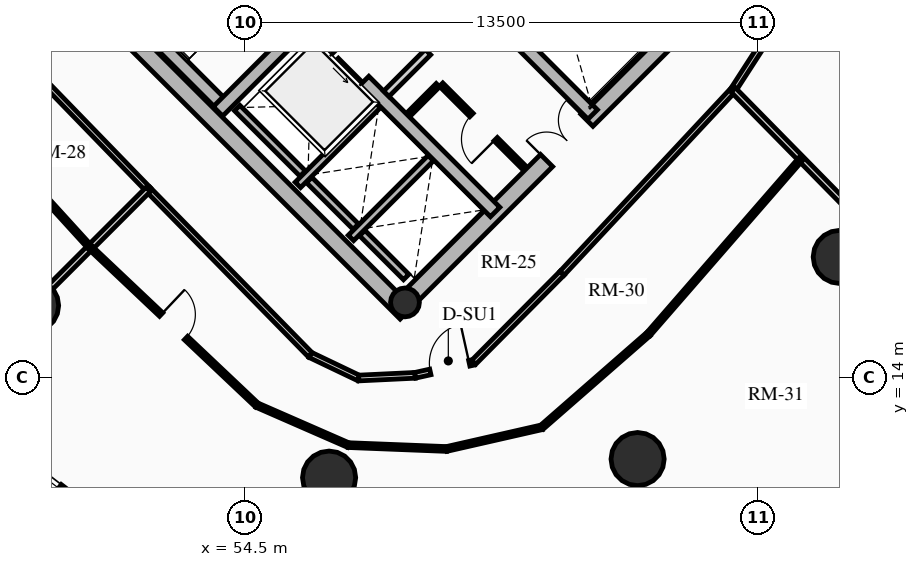
"""IFC4 building model, lengths in metres.
Left out: names, types, materials, properties, quantities, classifications, styles, units other than length and angle.
Written with IfcOpenShell. Run it as: python <this file> out.ifc"""

import sys

from ifc_helpers import new_model, si_unit, direction, frame, frame_2d, origin, origin_2d, place, context, subcontext, project, spatial, rectangle, circle, hollow_circle, extrude, source, transform, mapped, element, fill, save


model = new_model("IFC4")
c1 = context("Model", 3, precision=1e-05, world=origin(), true_north=direction((0.0, 1.0)))
c2 = subcontext(c1, "Body", "Model", "MODEL_VIEW")
j1 = project(units=[si_unit("LENGTHUNIT", "METRE"), si_unit("PLANEANGLEUNIT", "RADIAN")], contexts=[c1])
p1 = place(None, origin())
s1 = spatial("IfcSite", under=j1, at=p1, CompositionType="ELEMENT")
p2 = place(p1, origin())
s2 = spatial("IfcBuilding", under=s1, at=p2, CompositionType="ELEMENT")
p3 = place(p2, frame((0.0, 0.0, 87.61)))
s3 = spatial("IfcBuildingStorey", under=s2, at=p3, CompositionType="ELEMENT", Elevation=87.61)
p4 = place(p3, frame((58.737, 15.697, 0.0), z_axis=(0.0, 0.0, 1.0), x_axis=(-0.707106781187, 0.707106781187, 0.0)))
e1 = element("IfcWall", 1, at=p4, inside=s3, PredefinedType="SHEAR", context=c2, shape_type="SweptSolid", body=[
    extrude(rectangle(XDim=14.2, YDim=0.45, at=frame_2d((7.1, 0.0))), origin(), (0.0, 0.0, 1.0), 2.91),
])
p5 = place(p3, frame((58.578, 15.856, 0.0), z_axis=(0.0, 0.0, 1.0), x_axis=(0.707106781187, 0.707106781187, 0.0)))
e2 = element("IfcWall", 2, at=p5, inside=s3, PredefinedType="SHEAR", context=c2, shape_type="SweptSolid", body=[
    extrude(rectangle(XDim=10.7, YDim=0.45, at=frame_2d((5.35, 0.0))), origin(), (0.0, 0.0, 1.0), 2.91),
])
m1 = source(origin(), c2, "Body", "SweptSolid", [
    extrude(rectangle(XDim=1.5, YDim=2.02, at=frame_2d((0.75, 1.01))), frame((0.0, 0.235, 0.0), z_axis=(0.0, -1.0, 0.0), x_axis=(1.0, 0.0, 0.0)), (0.0, 0.0, 1.0), 0.47),
])
p6 = place(p5, frame((5.45, 0.0, 0.0)))
e3 = element("IfcOpeningElement", 3, at=p6, cuts=e2, PredefinedType="OPENING", context=c2, shape_type="MappedRepresentation", body=[
    mapped(m1, transform((0.0, 0.0, 0.0), x_axis=(1.0, 0.0, 0.0), y_axis=(0.0, 1.0, 0.0), z_axis=(0.0, 0.0, 1.0), scale=1.0)),
])
p7 = place(p3, frame((61.078, 18.355, 0.0), z_axis=(0.0, 0.0, 1.0), x_axis=(-0.707106781187, 0.707106781187, 0.0)))
e4 = element("IfcWall", 4, at=p7, inside=s3, PredefinedType="SHEAR", context=c2, shape_type="SweptSolid", body=[
    extrude(rectangle(XDim=13.75, YDim=0.35, at=frame_2d((6.875, 0.0))), origin(), (0.0, 0.0, 1.0), 2.91),
])
m2 = source(origin(), c2, "Body", "SweptSolid", [
    extrude(rectangle(XDim=1.1, YDim=2.015, at=frame_2d((0.55, 1.007))), frame((0.0, 0.185, 0.0), z_axis=(0.0, -1.0, 0.0), x_axis=(1.0, 0.0, 0.0)), (0.0, 0.0, 1.0), 0.37),
])
p8 = place(p7, frame((4.875, 0.0, 0.0)))
e5 = element("IfcOpeningElement", 5, at=p8, cuts=e4, PredefinedType="OPENING", context=c2, shape_type="MappedRepresentation", body=[
    mapped(m2, transform((0.0, 0.0, 0.0), x_axis=(1.0, 0.0, 0.0), y_axis=(0.0, 1.0, 0.0), z_axis=(0.0, 0.0, 1.0), scale=1.0)),
])
m3 = source(origin(), c2, "Body", "SweptSolid", [
    extrude(rectangle(XDim=1.15, YDim=2.02, at=frame_2d((0.575, 1.01))), frame((0.0, 0.185, 0.0), z_axis=(0.0, -1.0, 0.0), x_axis=(1.0, 0.0, 0.0)), (0.0, 0.0, 1.0), 0.37),
])
p9 = place(p7, frame((7.295, 0.0, 0.0)))
e6 = element("IfcOpeningElement", 6, at=p9, cuts=e4, PredefinedType="OPENING", context=c2, shape_type="MappedRepresentation", body=[
    mapped(m3, transform((0.0, 0.0, 0.0), x_axis=(1.0, 0.0, 0.0), y_axis=(0.0, 1.0, 0.0), z_axis=(0.0, 0.0, 1.0), scale=1.0)),
])
p10 = place(p3, frame((63.645, 20.922, 0.0), z_axis=(0.0, 0.0, 1.0), x_axis=(-0.707106781187, 0.707106781187, 0.0)))
e7 = element("IfcWall", 7, at=p10, inside=s3, PredefinedType="SHEAR", context=c2, shape_type="SweptSolid", body=[
    extrude(rectangle(XDim=13.75, YDim=0.35, at=frame_2d((6.875, 0.0))), origin(), (0.0, 0.0, 1.0), 2.91),
])
p11 = place(p10, frame((10.0, 0.0, 0.0)))
e8 = element("IfcOpeningElement", 8, at=p11, cuts=e7, PredefinedType="OPENING", context=c2, shape_type="MappedRepresentation", body=[
    mapped(m2, transform((0.0, 0.0, 0.0), x_axis=(1.0, 0.0, 0.0), y_axis=(0.0, 1.0, 0.0), z_axis=(0.0, 0.0, 1.0), scale=1.0)),
])
p12 = place(p10, frame((12.0, 0.0, 0.0)))
e9 = element("IfcOpeningElement", 9, at=p12, cuts=e7, PredefinedType="OPENING", context=c2, shape_type="MappedRepresentation", body=[
    mapped(m2, transform((0.0, 0.0, 0.0), x_axis=(1.0, 0.0, 0.0), y_axis=(0.0, 1.0, 0.0), z_axis=(0.0, 0.0, 1.0), scale=1.0)),
])
p13 = place(p10, frame((5.305, 0.0, 0.0)))
e10 = element("IfcOpeningElement", 10, at=p13, cuts=e7, PredefinedType="OPENING", context=c2, shape_type="MappedRepresentation", body=[
    mapped(m3, transform((0.0, 0.0, 0.0), x_axis=(1.0, 0.0, 0.0), y_axis=(0.0, 1.0, 0.0), z_axis=(0.0, 0.0, 1.0), scale=1.0)),
])
p14 = place(p3, frame((53.922, 21.141, 0.0), z_axis=(0.0, 0.0, 1.0), x_axis=(-0.707088616009, 0.707124945897, 0.0)))
e11 = element("IfcWall", 11, at=p14, inside=s3, PredefinedType="SHEAR", context=c2, shape_type="SweptSolid", body=[
    extrude(rectangle(XDim=6.72, YDim=0.35, at=frame_2d((3.36, 0.0))), origin(), (0.0, 0.0, 1.0), 2.91),
])
p15 = place(p3, frame((53.784, 21.003, 0.0), z_axis=(0.0, 0.0, 1.0), x_axis=(0.707106781187, 0.707106781187, 0.0)))
e12 = element("IfcWall", 12, at=p15, inside=s3, PredefinedType="SHEAR", context=c2, shape_type="SweptSolid", body=[
    extrude(rectangle(XDim=3.285, YDim=0.35, at=frame_2d((1.643, 0.0))), origin(), (0.0, 0.0, 1.0), 2.91),
])
p16 = place(p3, frame((58.706, 15.976, 0.0), z_axis=(0.0, 0.0, 1.0), x_axis=(0.707106781187, 0.707106781187, 0.0)))
e13 = element("IfcColumn", 13, at=p16, inside=s3, PredefinedType="COLUMN", context=c2, shape_type="SweptSolid", body=[
    extrude(hollow_circle(Radius=0.38, WallThickness=0.032, at=origin_2d()), origin(), (0.0, 0.0, 1.0), 2.91),
])
for number, where, z_axis, x_axis in (
    (14, (48.893, 15.893, 0.0), (0.0, 0.0, 1.0), (1.0, 0.0, 0.0)),
    (15, (56.709, 11.365, 0.0), (0.0, 0.0, 1.0), (1.0, 0.0, 0.0)),
    (16, (64.827, 11.854, 0.0), (0.0, 0.0, 1.0), (1.0, 0.0, 0.0)),
    (17, (70.146, 17.173, 0.0), (0.0, 0.0, 1.0), (1.0, 0.0, 0.0)),
):
    element("IfcColumn", number, at=place(p3, frame(where, z_axis=z_axis, x_axis=x_axis)), inside=s3, PredefinedType="USERDEFINED", context=c2, shape_type="SweptSolid", body=[
        extrude(circle(Radius=0.7, at=origin_2d()), origin(), (0.0, 0.0, 1.0), 2.91),
    ])
p17 = place(p3, frame((51.189, 9.855, 0.0), z_axis=(0.0, 0.0, 1.0), x_axis=(-0.791982052206, 0.61054437102, 0.0)))
e18 = element("IfcWall", 18, at=p17, inside=s3, PredefinedType="SOLIDWALL", context=c2, shape_type="SweptSolid", body=[
    extrude(rectangle(XDim=5.942, YDim=0.24, at=frame_2d((2.971, 0.0))), origin(), (0.0, 0.0, 1.0), 2.179),
])
m4 = source(origin(), c2, "Body", "SweptSolid", [
    extrude(rectangle(XDim=1.9, YDim=1.35, at=frame_2d((0.95, 0.675))), frame((0.0, 0.13, 0.0), z_axis=(0.0, -1.0, 0.0), x_axis=(1.0, 0.0, 0.0)), (0.0, 0.0, 1.0), 0.26),
])
p18 = place(p17, frame((2.021, 0.0, 0.65)))
e19 = element("IfcOpeningElement", 19, at=p18, cuts=e18, PredefinedType="OPENING", context=c2, shape_type="MappedRepresentation", body=[
    mapped(m4, transform((0.0, 0.0, 0.0), x_axis=(1.0, 0.0, 0.0), y_axis=(0.0, 1.0, 0.0), z_axis=(0.0, 0.0, 1.0), scale=1.0)),
])
p19 = place(p3, frame((55.888, 19.069, 0.0), z_axis=(0.0, 0.0, 1.0), x_axis=(0.707106781187, 0.707106781187, 0.0)))
e20 = element("IfcWall", 20, at=p19, inside=s3, PredefinedType="SHEAR", context=c2, shape_type="SweptSolid", body=[
    extrude(rectangle(XDim=2.97, YDim=0.2, at=frame_2d((1.485, 0.0))), origin(), (0.0, 0.0, 1.0), 2.91),
])
p20 = place(p3, frame((56.015, 19.366, 0.0), z_axis=(0.0, 0.0, 1.0), x_axis=(-0.707106781187, 0.707106781187, 0.0)))
e21 = element("IfcWall", 21, at=p20, inside=s3, PredefinedType="SHEAR", context=c2, shape_type="SweptSolid", body=[
    extrude(rectangle(XDim=2.44, YDim=0.2, at=frame_2d((1.22, 0.0))), origin(), (0.0, 0.0, 1.0), 2.91),
])
p21 = place(p3, frame((57.284, 17.673, 0.0), z_axis=(0.0, 0.0, 1.0), x_axis=(0.707147878904, 0.70706568108, 0.0)))
e22 = element("IfcWall", 22, at=p21, inside=s3, PredefinedType="SHEAR", context=c2, shape_type="SweptSolid", body=[
    extrude(rectangle(XDim=2.97, YDim=0.2, at=frame_2d((1.485, 0.0))), origin(), (0.0, 0.0, 1.0), 2.91),
])
p22 = place(p3, frame((57.412, 17.97, 0.0), z_axis=(0.0, 0.0, 1.0), x_axis=(-0.707106781187, 0.707106781187, 0.0)))
e23 = element("IfcWall", 23, at=p22, inside=s3, PredefinedType="SHEAR", context=c2, shape_type="SweptSolid", body=[
    extrude(rectangle(XDim=1.735, YDim=0.2, at=frame_2d((0.867, 0.0))), origin(), (0.0, 0.0, 1.0), 2.91),
])
p23 = place(p3, frame((58.737, 16.644, 0.0), z_axis=(0.0, 0.0, 1.0), x_axis=(-0.707032117043, 0.707181437447, 0.0)))
e24 = element("IfcWall", 24, at=p23, inside=s3, PredefinedType="SHEAR", context=c2, shape_type="SweptSolid", body=[
    extrude(rectangle(XDim=1.635, YDim=0.2, at=frame_2d((0.817, 0.0))), origin(), (0.0, 0.0, 1.0), 2.91),
])
p24 = place(p3, frame((58.214, 21.467, 0.0), z_axis=(0.0, 0.0, 1.0), x_axis=(0.707106781187, 0.707106781187, 0.0)))
e25 = element("IfcWall", 25, at=p24, inside=s3, PredefinedType="PARTITIONING", context=c2, shape_type="SweptSolid", body=[
    extrude(rectangle(XDim=3.28, YDim=0.2, at=frame_2d((1.64, 0.0))), origin(), (0.0, 0.0, 1.0), 2.655),
])
m5 = source(origin(), c2, "Body", "SweptSolid", [
    extrude(rectangle(XDim=1.5, YDim=2.02, at=frame_2d((0.75, 1.01))), frame((0.0, 0.11, 0.0), z_axis=(0.0, -1.0, 0.0), x_axis=(1.0, 0.0, 0.0)), (0.0, 0.0, 1.0), 0.22),
])
p25 = place(p24, frame((1.55, 0.0, 0.0)))
e26 = element("IfcOpeningElement", 26, at=p25, cuts=e25, PredefinedType="OPENING", context=c2, shape_type="MappedRepresentation", body=[
    mapped(m5, transform((0.0, 0.0, 0.0), x_axis=(1.0, 0.0, 0.0), y_axis=(0.0, 1.0, 0.0), z_axis=(0.0, 0.0, 1.0), scale=1.0)),
])
p26 = place(p3, frame((61.835, 19.529, 0.0), z_axis=(0.0, 0.0, 1.0), x_axis=(-0.707146413884, 0.707067146267, 0.0)))
e27 = element("IfcWall", 27, at=p26, inside=s3, PredefinedType="PARTITIONING", context=c2, shape_type="SweptSolid", body=[
    extrude(rectangle(XDim=3.08, YDim=0.125, at=frame_2d((1.54, 0.0))), origin(), (0.0, 0.0, 1.0), 2.655),
])
m6 = source(origin(), c2, "Body", "SweptSolid", [
    extrude(rectangle(XDim=0.9, YDim=2.005, at=frame_2d((0.45, 1.002))), frame((0.0, 0.073, 0.0), z_axis=(0.0, -1.0, 0.0), x_axis=(1.0, 0.0, 0.0)), (0.0, 0.0, 1.0), 0.145),
])
p27 = place(p26, frame((1.05, 0.0, 0.0)))
e28 = element("IfcOpeningElement", 28, at=p27, cuts=e27, PredefinedType="OPENING", context=c2, shape_type="MappedRepresentation", body=[
    mapped(m6, transform((0.0, 0.0, 0.0), x_axis=(1.0, 0.0, 0.0), y_axis=(0.0, 1.0, 0.0), z_axis=(0.0, 0.0, 1.0), scale=1.0)),
])
p28 = place(p3, frame((58.794, 20.915, 0.0), z_axis=(0.0, 0.0, 1.0), x_axis=(0.707106781187, 0.707106781187, 0.0)))
e29 = element("IfcWall", 29, at=p28, inside=s3, PredefinedType="PARTITIONING", context=c2, shape_type="SweptSolid", body=[
    extrude(rectangle(XDim=1.1, YDim=0.125, at=frame_2d((0.55, 0.0))), origin(), (0.0, 0.0, 1.0), 2.655),
])
p29 = place(p3, frame((47.786, 23.242, 0.0), z_axis=(0.0, 0.0, 1.0), x_axis=(0.696183456981, -0.717863910659, 0.0)))
e30 = element("IfcWall", 30, at=p29, inside=s3, PredefinedType="PARTITIONING", context=c2, shape_type="SweptSolid", body=[
    extrude(rectangle(XDim=5.979, YDim=0.15, at=frame_2d((2.99, 0.0))), origin(), (0.0, 0.0, 1.0), 2.655),
])
p30 = place(p3, frame((51.949, 18.949, 0.0), z_axis=(0.0, 0.0, 1.0), x_axis=(0.699801520154, -0.714337337951, 0.0)))
e31 = element("IfcWall", 31, at=p30, inside=s3, PredefinedType="PARTITIONING", context=c2, shape_type="SweptSolid", body=[
    extrude(rectangle(XDim=6.097, YDim=0.15, at=frame_2d((3.048, 0.0))), origin(), (0.0, 0.0, 1.0), 2.225),
])
p31 = place(p3, frame((56.216, 14.594, 0.0), z_axis=(0.0, 0.0, 1.0), x_axis=(0.902219207281, -0.431277755064, 0.0)))
e32 = element("IfcWall", 32, at=p31, inside=s3, PredefinedType="PARTITIONING", context=c2, shape_type="SweptSolid", body=[
    extrude(rectangle(XDim=1.41, YDim=0.15, at=frame_2d((0.705, 0.0))), origin(), (0.0, 0.0, 1.0), 2.225),
])
p32 = place(p3, frame((57.488, 13.986, 0.0), z_axis=(0.0, 0.0, 1.0), x_axis=(0.998863298217, 0.047666670476, 0.0)))
e33 = element("IfcWall", 33, at=p32, inside=s3, PredefinedType="PARTITIONING", context=c2, shape_type="SweptSolid", body=[
    extrude(rectangle(XDim=1.485, YDim=0.15, at=frame_2d((0.743, 0.0))), origin(), (0.0, 0.0, 1.0), 2.225),
])
p33 = place(p3, frame((58.971, 14.057, 0.0), z_axis=(0.0, 0.0, 1.0), x_axis=(0.976085233804, 0.217388169756, 0.0)))
e34 = element("IfcWall", 34, at=p33, inside=s3, PredefinedType="PARTITIONING", context=c2, shape_type="SweptSolid", body=[
    extrude(rectangle(XDim=1.581, YDim=0.15, at=frame_2d((0.791, 0.0))), origin(), (0.0, 0.0, 1.0), 2.225),
])
m7 = source(origin(), c2, "Body", "SweptSolid", [
    extrude(rectangle(XDim=1.05, YDim=2.015, at=frame_2d((0.525, 1.007))), frame((0.0, 0.085, 0.0), z_axis=(0.0, -1.0, 0.0), x_axis=(1.0, 0.0, 0.0)), (0.0, 0.0, 1.0), 0.17),
])
p34 = place(p33, frame((0.411, 0.0, 0.0)))
e35 = element("IfcOpeningElement", 35, at=p34, cuts=e34, PredefinedType="OPENING", context=c2, shape_type="MappedRepresentation", body=[
    mapped(m7, transform((0.0, 0.0, 0.0), x_axis=(1.0, 0.0, 0.0), y_axis=(0.0, 1.0, 0.0), z_axis=(0.0, 0.0, 1.0), scale=1.0)),
])
p35 = place(p3, frame((60.515, 14.401, 0.0), z_axis=(0.0, 0.0, 1.0), x_axis=(0.704179607439, 0.710021887316, 0.0)))
e36 = element("IfcWall", 36, at=p35, inside=s3, PredefinedType="PARTITIONING", context=c2, shape_type="SweptSolid", body=[
    extrude(rectangle(XDim=3.301, YDim=0.15, at=frame_2d((1.651, 0.0))), origin(), (0.0, 0.0, 1.0), 2.225),
])
p36 = place(p3, frame((62.839, 16.745, 0.0), z_axis=(0.0, 0.0, 1.0), x_axis=(0.682386779427, 0.73099130177, 0.0)))
e37 = element("IfcWall", 37, at=p36, inside=s3, PredefinedType="PARTITIONING", context=c2, shape_type="SweptSolid", body=[
    extrude(rectangle(XDim=6.6, YDim=0.15, at=frame_2d((3.3, 0.0))), origin(), (0.0, 0.0, 1.0), 2.225),
])
p37 = place(p3, frame((67.343, 21.569, 0.0), z_axis=(0.0, 0.0, 1.0), x_axis=(0.542722446786, 0.83991210597, 0.0)))
e38 = element("IfcWall", 38, at=p37, inside=s3, PredefinedType="PARTITIONING", context=c2, shape_type="SweptSolid", body=[
    extrude(rectangle(XDim=1.876, YDim=0.15, at=frame_2d((0.938, 0.0))), origin(), (0.0, 0.0, 1.0), 2.225),
])
p38 = place(p3, frame((51.949, 18.949, 0.0), z_axis=(0.0, 0.0, 1.0), x_axis=(-0.707106781187, -0.707106781187, 0.0)))
e39 = element("IfcWall", 39, at=p38, inside=s3, PredefinedType="PARTITIONING", context=c2, shape_type="SweptSolid", body=[
    extrude(rectangle(XDim=7.711, YDim=0.16, at=frame_2d((3.855, 0.0))), origin(), (0.0, 0.0, 1.0), 2.179),
])
p39 = place(p3, frame((67.343, 21.569, 0.0), z_axis=(0.0, 0.0, 1.0), x_axis=(0.700899237588, -0.713260302238, 0.0)))
e40 = element("IfcWall", 40, at=p39, inside=s3, PredefinedType="PARTITIONING", context=c2, shape_type="SweptSolid", body=[
    extrude(rectangle(XDim=9.085, YDim=0.16, at=frame_2d((4.543, 0.0))), origin(), (0.0, 0.0, 1.0), 2.179),
])
p40 = place(p3, frame((46.41, 21.83, 0.0), z_axis=(0.0, 0.0, 1.0), x_axis=(0.6732109009, -0.739450527696, 0.0)))
e41 = element("IfcWall", 41, at=p40, inside=s3, PredefinedType="PARTITIONING", context=c2, shape_type="SweptSolid", body=[
    extrude(rectangle(XDim=5.96, YDim=0.125, at=frame_2d((2.98, 0.0))), origin(), (0.0, 0.0, 1.0), 2.655),
])
p41 = place(p3, frame((50.423, 17.423, 0.0), z_axis=(0.0, 0.0, 1.0), x_axis=(0.726497320663, -0.68716929724, 0.0)))
e42 = element("IfcWall", 42, at=p41, inside=s3, PredefinedType="PARTITIONING", context=c2, shape_type="SweptSolid", body=[
    extrude(rectangle(XDim=6.04, YDim=0.125, at=frame_2d((3.02, 0.0))), origin(), (0.0, 0.0, 1.0), 2.225),
])
p42 = place(p41, frame((2.57, 0.0, 0.0)))
e43 = element("IfcOpeningElement", 43, at=p42, cuts=e42, PredefinedType="OPENING", context=c2, shape_type="MappedRepresentation", body=[
    mapped(m6, transform((0.0, 0.0, 0.0), x_axis=(1.0, 0.0, 0.0), y_axis=(0.0, 1.0, 0.0), z_axis=(0.0, 0.0, 1.0), scale=1.0)),
])
p43 = place(p3, frame((54.811, 13.272, 0.0), z_axis=(0.0, 0.0, 1.0), x_axis=(0.91625765715, -0.400589447831, 0.0)))
e44 = element("IfcWall", 44, at=p43, inside=s3, PredefinedType="PARTITIONING", context=c2, shape_type="SweptSolid", body=[
    extrude(rectangle(XDim=2.624, YDim=0.125, at=frame_2d((1.312, 0.0))), origin(), (0.0, 0.0, 1.0), 2.225),
])
p44 = place(p3, frame((57.215, 12.221, 0.0), z_axis=(0.0, 0.0, 1.0), x_axis=(0.999225050732, -0.039361122818, 0.0)))
e45 = element("IfcWall", 45, at=p44, inside=s3, PredefinedType="PARTITIONING", context=c2, shape_type="SweptSolid", body=[
    extrude(rectangle(XDim=2.586, YDim=0.125, at=frame_2d((1.293, 0.0))), origin(), (0.0, 0.0, 1.0), 2.655),
])
p45 = place(p3, frame((59.8, 12.119, 0.0), z_axis=(0.0, 0.0, 1.0), x_axis=(0.975045061532, 0.222007044895, 0.0)))
e46 = element("IfcWall", 46, at=p45, inside=s3, PredefinedType="PARTITIONING", context=c2, shape_type="SweptSolid", body=[
    extrude(rectangle(XDim=2.57, YDim=0.125, at=frame_2d((1.285, 0.0))), origin(), (0.0, 0.0, 1.0), 2.225),
])
p46 = place(p3, frame((62.306, 12.689, 0.0), z_axis=(0.0, 0.0, 1.0), x_axis=(0.753127589311, 0.657874482115, 0.0)))
e47 = element("IfcWall", 47, at=p46, inside=s3, PredefinedType="PARTITIONING", context=c2, shape_type="SweptSolid", body=[
    extrude(rectangle(XDim=3.732, YDim=0.125, at=frame_2d((1.866, 0.0))), origin(), (0.0, 0.0, 1.0), 2.225),
])
p47 = place(p3, frame((65.116, 15.145, 0.0), z_axis=(0.0, 0.0, 1.0), x_axis=(0.656272685344, 0.75452379848, 0.0)))
e48 = element("IfcWall", 48, at=p47, inside=s3, PredefinedType="PARTITIONING", context=c2, shape_type="SweptSolid", body=[
    extrude(rectangle(XDim=6.11, YDim=0.125, at=frame_2d((3.055, 0.0))), origin(), (0.0, 0.0, 1.0), 2.225),
])
m8 = source(origin(), c2, "Body", "SweptSolid", [
    extrude(rectangle(XDim=1.9, YDim=1.35, at=frame_2d((0.95, 0.675))), frame((0.0, 0.03, 0.0), z_axis=(0.0, -1.0, 0.0), x_axis=(1.0, 0.0, 0.0)), (0.0, 0.0, 1.0), 0.06),
])
p48 = place(p18, origin())
e49 = element("IfcWindow", 49, at=p48, inside=s3, PartitioningType="DOUBLE_PANEL_VERTICAL", PredefinedType="WINDOW", context=c2, shape_type="MappedRepresentation", body=[
    mapped(m8, transform((0.0, 0.0, 0.0), x_axis=(1.0, 0.0, 0.0), y_axis=(0.0, 1.0, 0.0), z_axis=(0.0, 0.0, 1.0), scale=1.0)),
])
fill(e19, e49)
m9 = source(origin(), c2, "Body", "SweptSolid", [
    extrude(rectangle(XDim=1.1, YDim=2.015, at=frame_2d((0.55, 1.007))), frame((0.0, 0.025, 0.0), z_axis=(0.0, -1.0, 0.0), x_axis=(1.0, 0.0, 0.0)), (0.0, 0.0, 1.0), 0.05),
])
p49 = place(p8, origin())
e50 = element("IfcDoor", 50, at=p49, inside=s3, OperationType="SLIDING_TO_LEFT", PredefinedType="DOOR", context=c2, shape_type="MappedRepresentation", body=[
    mapped(m9, transform((0.0, 0.0, 0.0), x_axis=(1.0, 0.0, 0.0), y_axis=(0.0, 1.0, 0.0), z_axis=(0.0, 0.0, 1.0), scale=1.0)),
])
fill(e5, e50)
m10 = source(origin(), c2, "Body", "SweptSolid", [
    extrude(rectangle(XDim=1.5, YDim=2.02, at=frame_2d((0.75, 1.01))), frame((0.0, 0.025, 0.0), z_axis=(0.0, -1.0, 0.0), x_axis=(1.0, 0.0, 0.0)), (0.0, 0.0, 1.0), 0.05),
])
p50 = place(p6, origin())
e51 = element("IfcDoor", 51, at=p50, inside=s3, OperationType="DOUBLE_DOOR_SINGLE_SWING", PredefinedType="DOOR", context=c2, shape_type="MappedRepresentation", body=[
    mapped(m10, transform((0.0, 0.0, 0.0), x_axis=(1.0, 0.0, 0.0), y_axis=(0.0, 1.0, 0.0), z_axis=(0.0, 0.0, 1.0), scale=1.0)),
])
fill(e3, e51)
p51 = place(p25, origin())
e52 = element("IfcDoor", 52, at=p51, inside=s3, OperationType="DOUBLE_DOOR_SINGLE_SWING", PredefinedType="DOOR", context=c2, shape_type="MappedRepresentation", body=[
    mapped(m10, transform((0.0, 0.0, 0.0), x_axis=(1.0, 0.0, 0.0), y_axis=(0.0, 1.0, 0.0), z_axis=(0.0, 0.0, 1.0), scale=1.0)),
])
fill(e26, e52)
m11 = source(origin(), c2, "Body", "SweptSolid", [
    extrude(rectangle(XDim=0.9, YDim=2.005, at=frame_2d((0.45, 1.002))), frame((0.0, 0.025, 0.0), z_axis=(0.0, -1.0, 0.0), x_axis=(1.0, 0.0, 0.0)), (0.0, 0.0, 1.0), 0.05),
])
p52 = place(p27, origin())
e53 = element("IfcDoor", 53, at=p52, inside=s3, OperationType="SINGLE_SWING_LEFT", PredefinedType="DOOR", context=c2, shape_type="MappedRepresentation", body=[
    mapped(m11, transform((0.0, 0.0, 0.0), x_axis=(1.0, 0.0, 0.0), y_axis=(0.0, 1.0, 0.0), z_axis=(0.0, 0.0, 1.0), scale=1.0)),
])
fill(e28, e53)
m12 = source(origin(), c2, "Body", "SweptSolid", [
    extrude(rectangle(XDim=1.05, YDim=2.015, at=frame_2d((0.525, 1.007))), frame((0.0, 0.025, 0.0), z_axis=(0.0, -1.0, 0.0), x_axis=(1.0, 0.0, 0.0)), (0.0, 0.0, 1.0), 0.05),
])
p53 = place(p34, origin())
e54 = element("IfcDoor", 54, at=p53, inside=s3, OperationType="SINGLE_SWING_RIGHT", PredefinedType="DOOR", context=c2, shape_type="MappedRepresentation", body=[
    mapped(m12, transform((0.0, 0.0, 0.0), x_axis=(1.0, 0.0, 0.0), y_axis=(0.0, 1.0, 0.0), z_axis=(0.0, 0.0, 1.0), scale=1.0)),
])
fill(e35, e54)
p54 = place(p42, origin())
e55 = element("IfcDoor", 55, at=p54, inside=s3, OperationType="SINGLE_SWING_LEFT", PredefinedType="DOOR", context=c2, shape_type="MappedRepresentation", body=[
    mapped(m11, transform((0.0, 0.0, 0.0), x_axis=(1.0, 0.0, 0.0), y_axis=(0.0, 1.0, 0.0), z_axis=(0.0, 0.0, 1.0), scale=1.0)),
])
fill(e43, e55)
save(model, sys.argv[1])
